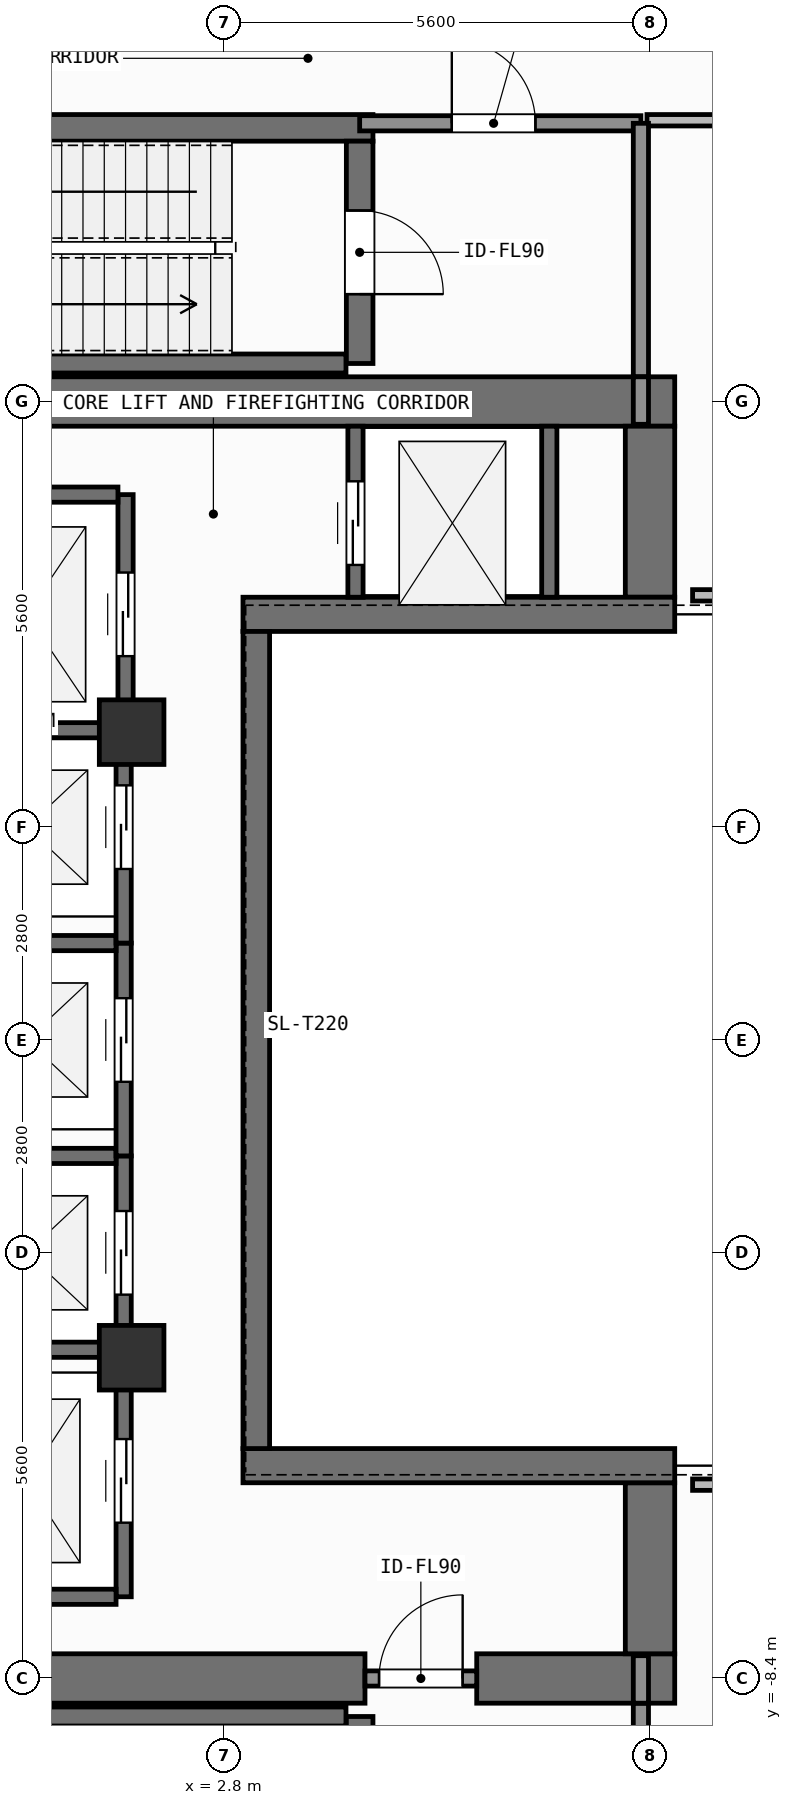
"""IFC4 building model, lengths in metres.
Left out: names, types, materials, properties, quantities, classifications, styles, units other than length and angle.
Written with IfcOpenShell. Run it as: python <this file> out.ifc"""

import sys

from ifc_helpers import new_model, si_unit, direction, frame, frame_2d, origin, origin_2d, place, context, subcontext, project, spatial, rectangle, extrude, element, fill, save


model = new_model("IFC4")
c1 = context("Model", 3, precision=1e-05, world=origin(), true_north=direction((0.0, 1.0)))
c2 = subcontext(c1, "Body", "Model", "MODEL_VIEW")
j1 = project(units=[si_unit("LENGTHUNIT", "METRE"), si_unit("PLANEANGLEUNIT", "RADIAN")], contexts=[c1])
p1 = place(None, origin())
s1 = spatial("IfcSite", under=j1, at=p1, CompositionType="ELEMENT")
p2 = place(p1, origin())
s2 = spatial("IfcBuilding", under=s1, at=p2, CompositionType="ELEMENT")
p3 = place(p2, frame((0.0, 0.0, 258.6)))
s3 = spatial("IfcBuildingStorey", under=s2, at=p3, CompositionType="ELEMENT", Elevation=258.6)
p4 = place(p3, frame((-2.62, -8.4, 0.0), z_axis=(0.0, 0.0, 1.0), x_axis=(1.0, 0.0, 0.0)))
e1 = element("IfcWall", 1, at=p4, inside=s3, PredefinedType="SHEAR", context=c2, shape_type="SweptSolid", body=[
    extrude(rectangle(XDim=7.27, YDim=0.65, at=frame_2d((3.635, 0.0))), origin(), (0.0, 0.0, 1.0), 3.9),
])
p5 = place(p3, frame((6.12, -8.4, 0.0), z_axis=(0.0, 0.0, 1.0), x_axis=(1.0, 0.0, 0.0)))
e2 = element("IfcWall", 2, at=p5, inside=s3, PredefinedType="SHEAR", context=c2, shape_type="SweptSolid", body=[
    extrude(rectangle(XDim=2.605, YDim=0.65, at=frame_2d((1.302, 0.0))), origin(), (0.0, 0.0, 1.0), 3.9),
])
p6 = place(p3, frame((-7.55, 8.4, 0.0), z_axis=(0.0, 0.0, 1.0), x_axis=(1.0, 0.0, 0.0)))
e3 = element("IfcWall", 3, at=p6, inside=s3, PredefinedType="SHEAR", context=c2, shape_type="SweptSolid", body=[
    extrude(rectangle(XDim=16.275, YDim=0.65, at=frame_2d((8.138, 0.0))), origin(), (0.0, 0.0, 1.0), 3.9),
])
for number, where, z_axis, x_axis in (
    (4, (8.4, -8.075, 0.0), (0.0, 0.0, 1.0), (0.0, 1.0, 0.0)),
    (5, (8.4, 5.825, 0.0), (0.0, 0.0, 1.0), (0.0, 1.0, 0.0)),
):
    element("IfcWall", number, at=place(p3, frame(where, z_axis=z_axis, x_axis=x_axis)), inside=s3, PredefinedType="SHEAR", context=c2, shape_type="SweptSolid", body=[
        extrude(rectangle(XDim=2.25, YDim=0.65, at=frame_2d((1.125, 0.0))), origin(), (0.0, 0.0, 1.0), 3.9),
    ])
for number, where, z_axis, x_axis in (
    (6, (3.045, -5.6, 0.0), (0.0, 0.0, 1.0), (1.0, 0.0, 0.0)),
    (7, (3.045, 5.6, 0.0), (0.0, 0.0, 1.0), (1.0, 0.0, 0.0)),
):
    element("IfcWall", number, at=place(p3, frame(where, z_axis=z_axis, x_axis=x_axis)), inside=s3, PredefinedType="SHEAR", context=c2, shape_type="SweptSolid", body=[
        extrude(rectangle(XDim=5.68, YDim=0.45, at=frame_2d((2.84, 0.0))), origin(), (0.0, 0.0, 1.0), 3.9),
    ])
p7 = place(p3, frame((3.22, -5.375, 0.0), z_axis=(0.0, 0.0, 1.0), x_axis=(0.0, 1.0, 0.0)))
e8 = element("IfcWall", 8, at=p7, inside=s3, PredefinedType="SHEAR", context=c2, shape_type="SweptSolid", body=[
    extrude(rectangle(XDim=10.75, YDim=0.35, at=frame_2d((5.375, 0.0))), origin(), (0.0, 0.0, 1.0), 3.9),
])
p8 = place(p3, frame((-2.2, -8.9, 0.0), z_axis=(0.0, 0.0, 1.0), x_axis=(1.0, 0.0, 0.0)))
e9 = element("IfcWall", 9, at=p8, inside=s3, PredefinedType="SHEAR", context=c2, shape_type="SweptSolid", body=[
    extrude(rectangle(XDim=6.6, YDim=0.25, at=frame_2d((3.3, 0.0))), origin(), (0.0, 0.0, 1.0), 3.9),
])
p9 = place(p3, frame((4.58, -8.9, 0.0), z_axis=(0.0, 0.0, 1.0), x_axis=(0.0, -1.0, 0.0)))
e10 = element("IfcWall", 10, at=p9, inside=s3, PredefinedType="SHEAR", context=c2, shape_type="SweptSolid", body=[
    extrude(rectangle(XDim=2.925, YDim=0.35, at=frame_2d((1.462, 0.0))), origin(), (0.0, 0.0, 1.0), 3.9),
])
p10 = place(p9, frame((0.913, 0.0, 0.0)))
e11 = element("IfcOpeningElement", 11, at=p10, cuts=e10, PredefinedType="OPENING", context=c2, shape_type="SweptSolid", body=[
    extrude(rectangle(XDim=1.1, YDim=2.15, at=frame_2d((0.55, 1.075))), frame((0.0, 0.185, 0.0), z_axis=(0.0, -1.0, 0.0), x_axis=(1.0, 0.0, 0.0)), (0.0, 0.0, 1.0), 0.37),
])
p11 = place(p3, frame((-2.555, 12.0, 0.0), z_axis=(0.0, 0.0, 1.0), x_axis=(1.0, 0.0, 0.0)))
e12 = element("IfcWall", 12, at=p11, inside=s3, PredefinedType="SHEAR", context=c2, shape_type="SweptSolid", body=[
    extrude(rectangle(XDim=7.31, YDim=0.35, at=frame_2d((3.655, 0.0))), origin(), (0.0, 0.0, 1.0), 3.9),
])
p12 = place(p3, frame((-2.2, 8.9, 0.0), z_axis=(0.0, 0.0, 1.0), x_axis=(1.0, 0.0, 0.0)))
e13 = element("IfcWall", 13, at=p12, inside=s3, PredefinedType="SHEAR", context=c2, shape_type="SweptSolid", body=[
    extrude(rectangle(XDim=6.6, YDim=0.25, at=frame_2d((3.3, 0.0))), origin(), (0.0, 0.0, 1.0), 3.9),
])
p13 = place(p3, frame((4.58, 11.825, 0.0), z_axis=(0.0, 0.0, 1.0), x_axis=(0.0, -1.0, 0.0)))
e14 = element("IfcWall", 14, at=p13, inside=s3, PredefinedType="SHEAR", context=c2, shape_type="SweptSolid", body=[
    extrude(rectangle(XDim=2.925, YDim=0.35, at=frame_2d((1.462, 0.0))), origin(), (0.0, 0.0, 1.0), 3.9),
])
p14 = place(p13, frame((0.913, 0.0, 0.0)))
e15 = element("IfcOpeningElement", 15, at=p14, cuts=e14, PredefinedType="OPENING", context=c2, shape_type="SweptSolid", body=[
    extrude(rectangle(XDim=1.1, YDim=2.15, at=frame_2d((0.55, 1.075))), frame((0.0, 0.185, 0.0), z_axis=(0.0, -1.0, 0.0), x_axis=(1.0, 0.0, 0.0)), (0.0, 0.0, 1.0), 0.37),
])
for number, where, z_axis, x_axis in (
    (16, (1.58, -4.18, 0.0), (0.0, 0.0, 1.0), (1.0, 0.0, 0.0)),
    (17, (1.58, 4.05, 0.0), (0.0, 0.0, 1.0), (1.0, 0.0, 0.0)),
):
    element("IfcColumn", number, at=place(p3, frame(where, z_axis=z_axis, x_axis=x_axis)), inside=s3, PredefinedType="COLUMN", context=c2, shape_type="SweptSolid", body=[
        extrude(rectangle(XDim=0.85, YDim=0.85, at=origin_2d()), origin(), (0.0, 0.0, 1.0), 3.9),
    ])
p15 = place(p3, frame((1.475, -4.275, 0.0), z_axis=(0.0, 0.0, 1.0), x_axis=(0.0, 1.0, 0.0)))
e18 = element("IfcWall", 18, at=p15, inside=s3, PredefinedType="SHEAR", context=c2, shape_type="SweptSolid", body=[
    extrude(rectangle(XDim=2.75, YDim=0.2, at=frame_2d((1.375, 0.0))), origin(), (0.0, 0.0, 1.0), 3.68),
])
p16 = place(p15, frame((0.925, 0.0, 0.0)))
e19 = element("IfcOpeningElement", 19, at=p16, cuts=e18, PredefinedType="OPENING", context=c2, shape_type="SweptSolid", body=[
    extrude(rectangle(XDim=1.1, YDim=2.2, at=frame_2d((0.55, 1.1))), frame((0.0, 0.11, 0.0), z_axis=(0.0, -1.0, 0.0), x_axis=(1.0, 0.0, 0.0)), (0.0, 0.0, 1.0), 0.22),
])
for number, where, z_axis, x_axis in (
    (20, (-0.975, -4.075, 0.0), (0.0, 0.0, 1.0), (1.0, 0.0, 0.0)),
    (21, (-0.975, -1.525, 0.0), (0.0, 0.0, 1.0), (1.0, 0.0, 0.0)),
):
    element("IfcWall", number, at=place(p3, frame(where, z_axis=z_axis, x_axis=x_axis)), inside=s3, PredefinedType="SHEAR", context=c2, shape_type="SweptSolid", body=[
        extrude(rectangle(XDim=2.35, YDim=0.2, at=frame_2d((1.175, 0.0))), origin(), (0.0, 0.0, 1.0), 3.68),
    ])
p17 = place(p3, frame((1.475, -1.525, 0.0), z_axis=(0.0, 0.0, 1.0), x_axis=(0.0, 1.0, 0.0)))
e22 = element("IfcWall", 22, at=p17, inside=s3, PredefinedType="SHEAR", context=c2, shape_type="SweptSolid", body=[
    extrude(rectangle(XDim=2.8, YDim=0.2, at=frame_2d((1.4, 0.0))), origin(), (0.0, 0.0, 1.0), 3.68),
])
p18 = place(p17, frame((0.975, 0.0, 0.0)))
e23 = element("IfcOpeningElement", 23, at=p18, cuts=e22, PredefinedType="OPENING", context=c2, shape_type="SweptSolid", body=[
    extrude(rectangle(XDim=1.1, YDim=2.2, at=frame_2d((0.55, 1.1))), frame((0.0, 0.11, 0.0), z_axis=(0.0, -1.0, 0.0), x_axis=(1.0, 0.0, 0.0)), (0.0, 0.0, 1.0), 0.22),
])
p19 = place(p3, frame((-0.975, 1.275, 0.0), z_axis=(0.0, 0.0, 1.0), x_axis=(1.0, 0.0, 0.0)))
e24 = element("IfcWall", 24, at=p19, inside=s3, PredefinedType="SHEAR", context=c2, shape_type="SweptSolid", body=[
    extrude(rectangle(XDim=2.35, YDim=0.2, at=frame_2d((1.175, 0.0))), origin(), (0.0, 0.0, 1.0), 3.68),
])
p20 = place(p3, frame((1.475, 1.275, 0.0), z_axis=(0.0, 0.0, 1.0), x_axis=(0.0, 1.0, 0.0)))
e25 = element("IfcWall", 25, at=p20, inside=s3, PredefinedType="SHEAR", context=c2, shape_type="SweptSolid", body=[
    extrude(rectangle(XDim=2.8, YDim=0.2, at=frame_2d((1.4, 0.0))), origin(), (0.0, 0.0, 1.0), 3.68),
])
p21 = place(p20, frame((0.975, 0.0, 0.0)))
e26 = element("IfcOpeningElement", 26, at=p21, cuts=e25, PredefinedType="OPENING", context=c2, shape_type="SweptSolid", body=[
    extrude(rectangle(XDim=1.1, YDim=2.2, at=frame_2d((0.55, 1.1))), frame((0.0, 0.11, 0.0), z_axis=(0.0, -1.0, 0.0), x_axis=(1.0, 0.0, 0.0)), (0.0, 0.0, 1.0), 0.22),
])
p22 = place(p3, frame((-0.975, 4.075, 0.0), z_axis=(0.0, 0.0, 1.0), x_axis=(1.0, 0.0, 0.0)))
e27 = element("IfcWall", 27, at=p22, inside=s3, PredefinedType="SHEAR", context=c2, shape_type="SweptSolid", body=[
    extrude(rectangle(XDim=2.35, YDim=0.2, at=frame_2d((1.175, 0.0))), origin(), (0.0, 0.0, 1.0), 3.68),
])
p23 = place(p3, frame((1.5, 4.025, 0.0), z_axis=(0.0, 0.0, 1.0), x_axis=(0.0, 1.0, 0.0)))
e28 = element("IfcWall", 28, at=p23, inside=s3, PredefinedType="SHEAR", context=c2, shape_type="SweptSolid", body=[
    extrude(rectangle(XDim=3.15, YDim=0.2, at=frame_2d((1.575, 0.0))), origin(), (0.0, 0.0, 1.0), 3.68),
])
p24 = place(p23, frame((1.025, 0.0, 0.0)))
e29 = element("IfcOpeningElement", 29, at=p24, cuts=e28, PredefinedType="OPENING", context=c2, shape_type="SweptSolid", body=[
    extrude(rectangle(XDim=1.1, YDim=2.2, at=frame_2d((0.55, 1.1))), frame((0.0, 0.11, 0.0), z_axis=(0.0, -1.0, 0.0), x_axis=(1.0, 0.0, 0.0)), (0.0, 0.0, 1.0), 0.22),
])
p25 = place(p3, frame((-1.0, 7.175, 0.0), z_axis=(0.0, 0.0, 1.0), x_axis=(1.0, 0.0, 0.0)))
e30 = element("IfcWall", 30, at=p25, inside=s3, PredefinedType="SHEAR", context=c2, shape_type="SweptSolid", body=[
    extrude(rectangle(XDim=2.4, YDim=0.2, at=frame_2d((1.2, 0.0))), origin(), (0.0, 0.0, 1.0), 3.68),
])
p26 = place(p3, frame((1.475, -7.325, 0.0), z_axis=(0.0, 0.0, 1.0), x_axis=(0.0, 1.0, 0.0)))
e31 = element("IfcWall", 31, at=p26, inside=s3, PredefinedType="SHEAR", context=c2, shape_type="SweptSolid", body=[
    extrude(rectangle(XDim=3.05, YDim=0.2, at=frame_2d((1.525, 0.0))), origin(), (0.0, 0.0, 1.0), 3.68),
])
p27 = place(p26, frame((0.975, 0.0, 0.0)))
e32 = element("IfcOpeningElement", 32, at=p27, cuts=e31, PredefinedType="OPENING", context=c2, shape_type="SweptSolid", body=[
    extrude(rectangle(XDim=1.1, YDim=2.2, at=frame_2d((0.55, 1.1))), frame((0.0, 0.11, 0.0), z_axis=(0.0, -1.0, 0.0), x_axis=(1.0, 0.0, 0.0)), (0.0, 0.0, 1.0), 0.22),
])
p28 = place(p3, frame((-0.975, -7.325, 0.0), z_axis=(0.0, 0.0, 1.0), x_axis=(1.0, 0.0, 0.0)))
e33 = element("IfcWall", 33, at=p28, inside=s3, PredefinedType="SHEAR", context=c2, shape_type="SweptSolid", body=[
    extrude(rectangle(XDim=2.35, YDim=0.2, at=frame_2d((1.175, 0.0))), origin(), (0.0, 0.0, 1.0), 3.68),
])
p29 = place(p3, frame((4.525, 5.825, 0.0), z_axis=(0.0, 0.0, 1.0), x_axis=(0.0, 1.0, 0.0)))
e34 = element("IfcWall", 34, at=p29, inside=s3, PredefinedType="SHEAR", context=c2, shape_type="SweptSolid", body=[
    extrude(rectangle(XDim=2.25, YDim=0.2, at=frame_2d((1.125, 0.0))), origin(), (0.0, 0.0, 1.0), 3.68),
])
p30 = place(p29, frame((0.425, 0.0, 0.0)))
e35 = element("IfcOpeningElement", 35, at=p30, cuts=e34, PredefinedType="OPENING", context=c2, shape_type="SweptSolid", body=[
    extrude(rectangle(XDim=1.1, YDim=2.2, at=frame_2d((0.55, 1.1))), frame((0.0, 0.11, 0.0), z_axis=(0.0, -1.0, 0.0), x_axis=(1.0, 0.0, 0.0)), (0.0, 0.0, 1.0), 0.22),
])
p31 = place(p3, frame((7.075, 5.825, 0.0), z_axis=(0.0, 0.0, 1.0), x_axis=(0.0, 1.0, 0.0)))
e36 = element("IfcWall", 36, at=p31, inside=s3, PredefinedType="SHEAR", context=c2, shape_type="SweptSolid", body=[
    extrude(rectangle(XDim=2.25, YDim=0.2, at=frame_2d((1.125, 0.0))), origin(), (0.0, 0.0, 1.0), 3.68),
])
p32 = place(p3, frame((4.65, -8.4, 0.0), z_axis=(0.0, 0.0, 1.0), x_axis=(1.0, 0.0, 0.0)))
e37 = element("IfcWall", 37, at=p32, inside=s3, PredefinedType="SOLIDWALL", context=c2, shape_type="SweptSolid", body=[
    extrude(rectangle(XDim=1.47, YDim=0.2, at=frame_2d((0.735, 0.0))), origin(), (0.0, 0.0, 1.0), 2.92),
])
p33 = place(p32, frame((0.185, 0.0, 0.0)))
e38 = element("IfcOpeningElement", 38, at=p33, cuts=e37, PredefinedType="OPENING", context=c2, shape_type="SweptSolid", body=[
    extrude(rectangle(XDim=1.1, YDim=2.15, at=frame_2d((0.55, 1.075))), frame((0.0, 0.11, 0.0), z_axis=(0.0, -1.0, 0.0), x_axis=(1.0, 0.0, 0.0)), (0.0, 0.0, 1.0), 0.22),
])
p34 = place(p3, frame((4.58, 12.06, 0.0), z_axis=(0.0, 0.0, 1.0), x_axis=(1.0, 0.0, 0.0)))
e39 = element("IfcWall", 39, at=p34, inside=s3, PredefinedType="SOLIDWALL", context=c2, shape_type="SweptSolid", body=[
    extrude(rectangle(XDim=3.7, YDim=0.2, at=frame_2d((1.85, 0.0))), origin(), (0.0, 0.0, 1.0), 3.68),
])
p35 = place(p34, frame((1.212, 0.0, 0.0)))
e40 = element("IfcOpeningElement", 40, at=p35, cuts=e39, PredefinedType="OPENING", context=c2, shape_type="SweptSolid", body=[
    extrude(rectangle(XDim=1.1, YDim=2.15, at=frame_2d((0.55, 1.075))), frame((0.0, 0.11, 0.0), z_axis=(0.0, -1.0, 0.0), x_axis=(1.0, 0.0, 0.0)), (0.0, 0.0, 1.0), 0.22),
])
p36 = place(p3, frame((8.36, 12.1, 0.0), z_axis=(0.0, 0.0, 1.0), x_axis=(1.0, 0.0, 0.0)))
e41 = element("IfcWall", 41, at=p36, inside=s3, PredefinedType="PARTITIONING", context=c2, shape_type="SweptSolid", body=[
    extrude(rectangle(XDim=7.22, YDim=0.15, at=frame_2d((3.61, 0.0))), origin(), (0.0, 0.0, 1.0), 3.68),
])
p37 = place(p36, frame((3.513, 0.0, 0.0)))
e42 = element("IfcOpeningElement", 42, at=p37, cuts=e41, PredefinedType="OPENING", context=c2, shape_type="SweptSolid", body=[
    extrude(rectangle(XDim=0.9, YDim=2.1, at=frame_2d((0.45, 1.05))), frame((0.0, 0.085, 0.0), z_axis=(0.0, -1.0, 0.0), x_axis=(1.0, 0.0, 0.0)), (0.0, 0.0, 1.0), 0.17),
])
for number, where, z_axis, x_axis in (
    (43, (8.28, -12.06, 0.0), (0.0, 0.0, 1.0), (0.0, 1.0, 0.0)),
    (44, (8.28, 8.725, 0.0), (0.0, 0.0, 1.0), (0.0, 1.0, 0.0)),
):
    element("IfcWall", number, at=place(p3, frame(where, z_axis=z_axis, x_axis=x_axis)), inside=s3, PredefinedType="SOLIDWALL", context=c2, shape_type="SweptSolid", body=[
        extrude(rectangle(XDim=3.335, YDim=0.2, at=frame_2d((1.667, 0.0))), origin(), (0.0, 0.0, 1.0), 3.68),
    ])
p38 = place(p3, frame((8.28, -8.725, 0.0), z_axis=(0.0, 0.0, 1.0), x_axis=(0.0, 1.0, 0.0)))
e45 = element("IfcWall", 45, at=p38, inside=s3, PredefinedType="SOLIDWALL", context=c2, shape_type="SweptSolid", body=[
    extrude(rectangle(XDim=0.625, YDim=0.2, at=frame_2d((0.312, 0.0))), origin(), (0.0, 0.0, 1.0), 3.68),
])
p39 = place(p3, frame((8.96, -5.85, 0.0), z_axis=(0.0, 0.0, 1.0), x_axis=(1.0, 0.0, 0.0)))
e46 = element("IfcWall", 46, at=p39, inside=s3, PredefinedType="PARTITIONING", context=c2, shape_type="SweptSolid", body=[
    extrude(rectangle(XDim=6.62, YDim=0.15, at=frame_2d((3.31, 0.0))), origin(), (0.0, 0.0, 1.0), 3.68),
])
p40 = place(p3, frame((8.28, 8.1, 0.0), z_axis=(0.0, 0.0, 1.0), x_axis=(0.0, 1.0, 0.0)))
e47 = element("IfcWall", 47, at=p40, inside=s3, PredefinedType="SOLIDWALL", context=c2, shape_type="SweptSolid", body=[
    extrude(rectangle(XDim=0.625, YDim=0.2, at=frame_2d((0.312, 0.0))), origin(), (0.0, 0.0, 1.0), 3.68),
])
p41 = place(p3, frame((8.96, 5.85, 0.0), z_axis=(0.0, 0.0, 1.0), x_axis=(1.0, 0.0, 0.0)))
e48 = element("IfcWall", 48, at=p41, inside=s3, PredefinedType="PARTITIONING", context=c2, shape_type="SweptSolid", body=[
    extrude(rectangle(XDim=6.62, YDim=0.15, at=frame_2d((3.31, 0.0))), origin(), (0.0, 0.0, 1.0), 3.68),
])
p42 = place(p16, origin())
e49 = element("IfcDoor", 49, at=p42, inside=s3, OperationType="SLIDING_TO_LEFT", PredefinedType="DOOR", context=c2, shape_type="SweptSolid", body=[
    extrude(rectangle(XDim=1.1, YDim=2.2, at=frame_2d((0.55, 1.1))), frame((0.0, 0.025, 0.0), z_axis=(0.0, -1.0, 0.0), x_axis=(1.0, 0.0, 0.0)), (0.0, 0.0, 1.0), 0.05),
])
fill(e19, e49)
p43 = place(p18, origin())
e50 = element("IfcDoor", 50, at=p43, inside=s3, OperationType="SLIDING_TO_LEFT", PredefinedType="DOOR", context=c2, shape_type="SweptSolid", body=[
    extrude(rectangle(XDim=1.1, YDim=2.2, at=frame_2d((0.55, 1.1))), frame((0.0, 0.025, 0.0), z_axis=(0.0, -1.0, 0.0), x_axis=(1.0, 0.0, 0.0)), (0.0, 0.0, 1.0), 0.05),
])
fill(e23, e50)
p44 = place(p21, origin())
e51 = element("IfcDoor", 51, at=p44, inside=s3, OperationType="SLIDING_TO_LEFT", PredefinedType="DOOR", context=c2, shape_type="SweptSolid", body=[
    extrude(rectangle(XDim=1.1, YDim=2.2, at=frame_2d((0.55, 1.1))), frame((0.0, 0.025, 0.0), z_axis=(0.0, -1.0, 0.0), x_axis=(1.0, 0.0, 0.0)), (0.0, 0.0, 1.0), 0.05),
])
fill(e26, e51)
p45 = place(p24, origin())
e52 = element("IfcDoor", 52, at=p45, inside=s3, OperationType="SLIDING_TO_LEFT", PredefinedType="DOOR", context=c2, shape_type="SweptSolid", body=[
    extrude(rectangle(XDim=1.1, YDim=2.2, at=frame_2d((0.55, 1.1))), frame((0.0, 0.025, 0.0), z_axis=(0.0, -1.0, 0.0), x_axis=(1.0, 0.0, 0.0)), (0.0, 0.0, 1.0), 0.05),
])
fill(e29, e52)
p46 = place(p27, origin())
e53 = element("IfcDoor", 53, at=p46, inside=s3, OperationType="SLIDING_TO_LEFT", PredefinedType="DOOR", context=c2, shape_type="SweptSolid", body=[
    extrude(rectangle(XDim=1.1, YDim=2.2, at=frame_2d((0.55, 1.1))), frame((0.0, 0.025, 0.0), z_axis=(0.0, -1.0, 0.0), x_axis=(1.0, 0.0, 0.0)), (0.0, 0.0, 1.0), 0.05),
])
fill(e32, e53)
p47 = place(p30, origin())
e54 = element("IfcDoor", 54, at=p47, inside=s3, OperationType="SLIDING_TO_LEFT", PredefinedType="DOOR", context=c2, shape_type="SweptSolid", body=[
    extrude(rectangle(XDim=1.1, YDim=2.2, at=frame_2d((0.55, 1.1))), frame((0.0, 0.025, 0.0), z_axis=(0.0, -1.0, 0.0), x_axis=(1.0, 0.0, 0.0)), (0.0, 0.0, 1.0), 0.05),
])
fill(e35, e54)
p48 = place(p14, origin())
e55 = element("IfcDoor", 55, at=p48, inside=s3, OperationType="SINGLE_SWING_RIGHT", PredefinedType="DOOR", context=c2, shape_type="SweptSolid", body=[
    extrude(rectangle(XDim=1.1, YDim=2.15, at=frame_2d((0.55, 1.075))), frame((0.0, 0.025, 0.0), z_axis=(0.0, -1.0, 0.0), x_axis=(1.0, 0.0, 0.0)), (0.0, 0.0, 1.0), 0.05),
])
fill(e15, e55)
p49 = place(p33, origin())
e56 = element("IfcDoor", 56, at=p49, inside=s3, OperationType="SINGLE_SWING_RIGHT", PredefinedType="DOOR", context=c2, shape_type="SweptSolid", body=[
    extrude(rectangle(XDim=1.1, YDim=2.15, at=frame_2d((0.55, 1.075))), frame((0.0, 0.025, 0.0), z_axis=(0.0, -1.0, 0.0), x_axis=(1.0, 0.0, 0.0)), (0.0, 0.0, 1.0), 0.05),
])
fill(e38, e56)
p50 = place(p35, origin())
e57 = element("IfcDoor", 57, at=p50, inside=s3, OperationType="SINGLE_SWING_LEFT", PredefinedType="DOOR", context=c2, shape_type="SweptSolid", body=[
    extrude(rectangle(XDim=1.1, YDim=2.15, at=frame_2d((0.55, 1.075))), frame((0.0, 0.025, 0.0), z_axis=(0.0, -1.0, 0.0), x_axis=(1.0, 0.0, 0.0)), (0.0, 0.0, 1.0), 0.05),
])
fill(e40, e57)
save(model, sys.argv[1])
